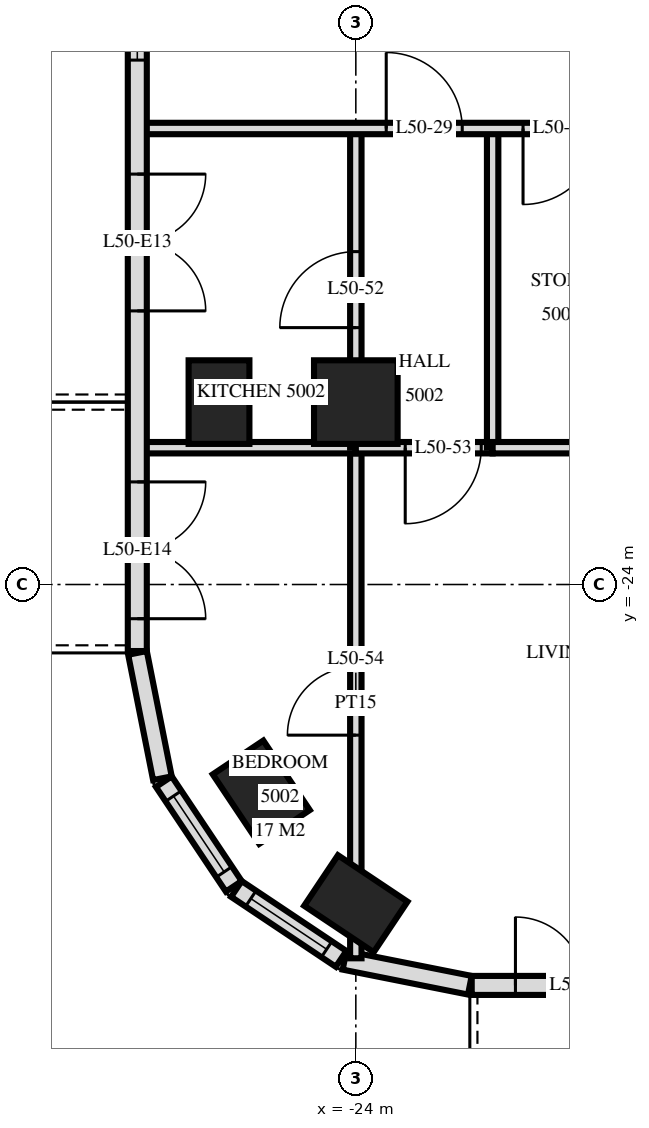
"""IFC4 building model, lengths in metres.
Left out: names, types, materials, properties, quantities, classifications, styles, units other than length and angle.
Written with IfcOpenShell. Run it as: python <this file> out.ifc"""

import sys

from ifc_helpers import new_model, si_unit, direction, frame, frame_2d, origin, origin_2d, place, context, subcontext, project, spatial, rectangle, extrude, element, fill, save


model = new_model("IFC4")
c1 = context("Model", 3, precision=1e-05, world=origin(), true_north=direction((0.0, 1.0)))
c2 = subcontext(c1, "Body", "Model", "MODEL_VIEW")
j1 = project(units=[si_unit("LENGTHUNIT", "METRE"), si_unit("PLANEANGLEUNIT", "RADIAN")], contexts=[c1])
p1 = place(None, origin())
s1 = spatial("IfcSite", under=j1, at=p1, CompositionType="ELEMENT")
p2 = place(p1, origin())
s2 = spatial("IfcBuilding", under=s1, at=p2, CompositionType="ELEMENT")
p3 = place(p2, frame((0.0, 0.0, 194.1)))
s3 = spatial("IfcBuildingStorey", under=s2, at=p3, CompositionType="ELEMENT", Elevation=194.1)
for number, where, z_axis, x_axis in (
    (1, (-25.8, -21.6, 0.0), (0.0, 0.0, 1.0), (0.0, 1.0, 0.0)),
    (2, (-25.244, -26.733, 0.0), (0.0, 0.0, 1.0), (-0.556, 0.831, 0.0)),
    (3, (-24.0, -28.2, 0.0), (0.0, 0.0, 1.0), (-0.831, 0.556, 0.0)),
):
    element("IfcColumn", number, at=place(p3, frame(where, z_axis=z_axis, x_axis=x_axis)), inside=s3, PredefinedType="COLUMN", context=c2, shape_type="SweptSolid", body=[
        extrude(rectangle(XDim=1.1, YDim=0.8, at=origin_2d()), origin(), (0.0, 0.0, 1.0), 3.5),
    ])
p4 = place(p3, frame((-24.0, -21.6, 0.0), z_axis=(0.0, 0.0, 1.0), x_axis=(1.0, 0.0, 0.0)))
e4 = element("IfcColumn", 4, at=p4, inside=s3, PredefinedType="COLUMN", context=c2, shape_type="SweptSolid", body=[
    extrude(rectangle(XDim=1.1, YDim=1.1, at=origin_2d()), origin(), (0.0, 0.0, 1.0), 3.5),
])
p5 = place(p3, frame((-26.875, -3.325, 0.0), z_axis=(0.0, 0.0, 1.0), x_axis=(0.0, -1.0, 0.0)))
e5 = element("IfcWall", 5, at=p5, inside=s3, PredefinedType="SOLIDWALL", context=c2, shape_type="SweptSolid", body=[
    extrude(rectangle(XDim=21.551, YDim=0.25, at=frame_2d((10.775, 0.0))), origin(), (0.0, 0.0, 1.0), 3.22),
])
p6 = place(p5, frame((7.775, 0.0, 0.0)))
e6 = element("IfcOpeningElement", 6, at=p6, cuts=e5, PredefinedType="OPENING", context=c2, shape_type="SweptSolid", body=[
    extrude(rectangle(XDim=1.8, YDim=2.4, at=frame_2d((0.9, 1.2))), frame((0.0, 0.135, 0.0), z_axis=(0.0, -1.0, 0.0), x_axis=(1.0, 0.0, 0.0)), (0.0, 0.0, 1.0), 0.27),
])
p7 = place(p5, frame((12.575, 0.0, 0.9)))
e7 = element("IfcOpeningElement", 7, at=p7, cuts=e5, PredefinedType="OPENING", context=c2, shape_type="SweptSolid", body=[
    extrude(rectangle(XDim=1.2, YDim=1.5, at=frame_2d((0.6, 0.75))), frame((0.0, 0.135, 0.0), z_axis=(0.0, -1.0, 0.0), x_axis=(1.0, 0.0, 0.0)), (0.0, 0.0, 1.0), 0.27),
])
p8 = place(p5, frame((15.275, 0.0, 0.0)))
e8 = element("IfcOpeningElement", 8, at=p8, cuts=e5, PredefinedType="OPENING", context=c2, shape_type="SweptSolid", body=[
    extrude(rectangle(XDim=1.8, YDim=2.4, at=frame_2d((0.9, 1.2))), frame((0.0, 0.135, 0.0), z_axis=(0.0, -1.0, 0.0), x_axis=(1.0, 0.0, 0.0)), (0.0, 0.0, 1.0), 0.27),
])
p9 = place(p5, frame((19.325, 0.0, 0.0)))
e9 = element("IfcOpeningElement", 9, at=p9, cuts=e5, PredefinedType="OPENING", context=c2, shape_type="SweptSolid", body=[
    extrude(rectangle(XDim=1.8, YDim=2.4, at=frame_2d((0.9, 1.2))), frame((0.0, 0.135, 0.0), z_axis=(0.0, -1.0, 0.0), x_axis=(1.0, 0.0, 0.0)), (0.0, 0.0, 1.0), 0.27),
])
p10 = place(p3, frame((-26.873, -24.9, 0.0), z_axis=(0.0, 0.0, 1.0), x_axis=(0.195026884138, -0.980797896849, 0.0)))
e10 = element("IfcWall", 10, at=p10, inside=s3, PredefinedType="SOLIDWALL", context=c2, shape_type="SweptSolid", body=[
    extrude(rectangle(XDim=1.681, YDim=0.25, at=frame_2d((0.841, 0.0))), origin(), (0.0, 0.0, 1.0), 3.22),
])
p11 = place(p3, frame((-26.526, -26.594, 0.0), z_axis=(0.0, 0.0, 1.0), x_axis=(0.55555029066, -0.831482937015, 0.0)))
e11 = element("IfcWall", 11, at=p11, inside=s3, PredefinedType="SOLIDWALL", context=c2, shape_type="SweptSolid", body=[
    extrude(rectangle(XDim=1.656, YDim=0.25, at=frame_2d((0.828, 0.0))), origin(), (0.0, 0.0, 1.0), 3.22),
])
p12 = place(p11, frame((0.228, 0.0, 0.9)))
e12 = element("IfcOpeningElement", 12, at=p12, cuts=e11, PredefinedType="OPENING", context=c2, shape_type="SweptSolid", body=[
    extrude(rectangle(XDim=1.2, YDim=1.5, at=frame_2d((0.6, 0.75))), frame((0.0, 0.135, 0.0), z_axis=(0.0, -1.0, 0.0), x_axis=(1.0, 0.0, 0.0)), (0.0, 0.0, 1.0), 0.27),
])
p13 = place(p3, frame((-25.571, -28.006, 0.0), z_axis=(0.0, 0.0, 1.0), x_axis=(0.831482937015, -0.55555029066, 0.0)))
e13 = element("IfcWall", 13, at=p13, inside=s3, PredefinedType="SOLIDWALL", context=c2, shape_type="SweptSolid", body=[
    extrude(rectangle(XDim=1.656, YDim=0.25, at=frame_2d((0.828, 0.0))), origin(), (0.0, 0.0, 1.0), 3.22),
])
p14 = place(p13, frame((0.228, 0.0, 0.9)))
e14 = element("IfcOpeningElement", 14, at=p14, cuts=e13, PredefinedType="OPENING", context=c2, shape_type="SweptSolid", body=[
    extrude(rectangle(XDim=1.2, YDim=1.5, at=frame_2d((0.6, 0.75))), frame((0.0, 0.135, 0.0), z_axis=(0.0, -1.0, 0.0), x_axis=(1.0, 0.0, 0.0)), (0.0, 0.0, 1.0), 0.27),
])
p15 = place(p3, frame((-24.149, -28.945, 0.0), z_axis=(0.0, 0.0, 1.0), x_axis=(0.980775640221, -0.19513878023, 0.0)))
e15 = element("IfcWall", 15, at=p15, inside=s3, PredefinedType="SOLIDWALL", context=c2, shape_type="SweptSolid", body=[
    extrude(rectangle(XDim=1.681, YDim=0.25, at=frame_2d((0.841, 0.0))), origin(), (0.0, 0.0, 1.0), 3.22),
])
p16 = place(p3, frame((-22.475, -29.275, 0.0), z_axis=(0.0, 0.0, 1.0), x_axis=(1.0, 0.0, 0.0)))
e16 = element("IfcWall", 16, at=p16, inside=s3, PredefinedType="SOLIDWALL", context=c2, shape_type="SweptSolid", body=[
    extrude(rectangle(XDim=44.951, YDim=0.25, at=frame_2d((22.475, 0.0))), origin(), (0.0, 0.0, 1.0), 3.22),
])
p17 = place(p16, frame((0.575, 0.0, 0.0)))
e17 = element("IfcOpeningElement", 17, at=p17, cuts=e16, PredefinedType="OPENING", context=c2, shape_type="SweptSolid", body=[
    extrude(rectangle(XDim=1.8, YDim=2.4, at=frame_2d((0.9, 1.2))), frame((0.0, 0.135, 0.0), z_axis=(0.0, -1.0, 0.0), x_axis=(1.0, 0.0, 0.0)), (0.0, 0.0, 1.0), 0.27),
])
p18 = place(p16, frame((6.575, 0.0, 0.0)))
e18 = element("IfcOpeningElement", 18, at=p18, cuts=e16, PredefinedType="OPENING", context=c2, shape_type="SweptSolid", body=[
    extrude(rectangle(XDim=1.8, YDim=2.4, at=frame_2d((0.9, 1.2))), frame((0.0, 0.135, 0.0), z_axis=(0.0, -1.0, 0.0), x_axis=(1.0, 0.0, 0.0)), (0.0, 0.0, 1.0), 0.27),
])
p19 = place(p16, frame((11.075, 0.0, 0.0)))
e19 = element("IfcOpeningElement", 19, at=p19, cuts=e16, PredefinedType="OPENING", context=c2, shape_type="SweptSolid", body=[
    extrude(rectangle(XDim=1.8, YDim=2.4, at=frame_2d((0.9, 1.2))), frame((0.0, 0.135, 0.0), z_axis=(0.0, -1.0, 0.0), x_axis=(1.0, 0.0, 0.0)), (0.0, 0.0, 1.0), 0.27),
])
p20 = place(p16, frame((13.775, 0.0, 0.9)))
e20 = element("IfcOpeningElement", 20, at=p20, cuts=e16, PredefinedType="OPENING", context=c2, shape_type="SweptSolid", body=[
    extrude(rectangle(XDim=2.4, YDim=1.5, at=frame_2d((1.2, 0.75))), frame((0.0, 0.135, 0.0), z_axis=(0.0, -1.0, 0.0), x_axis=(1.0, 0.0, 0.0)), (0.0, 0.0, 1.0), 0.27),
])
p21 = place(p16, frame((16.775, 0.0, 0.9)))
e21 = element("IfcOpeningElement", 21, at=p21, cuts=e16, PredefinedType="OPENING", context=c2, shape_type="SweptSolid", body=[
    extrude(rectangle(XDim=2.4, YDim=1.5, at=frame_2d((1.2, 0.75))), frame((0.0, 0.135, 0.0), z_axis=(0.0, -1.0, 0.0), x_axis=(1.0, 0.0, 0.0)), (0.0, 0.0, 1.0), 0.27),
])
p22 = place(p16, frame((20.075, 0.0, 0.0)))
e22 = element("IfcOpeningElement", 22, at=p22, cuts=e16, PredefinedType="OPENING", context=c2, shape_type="SweptSolid", body=[
    extrude(rectangle(XDim=1.8, YDim=2.4, at=frame_2d((0.9, 1.2))), frame((0.0, 0.135, 0.0), z_axis=(0.0, -1.0, 0.0), x_axis=(1.0, 0.0, 0.0)), (0.0, 0.0, 1.0), 0.27),
])
p23 = place(p16, frame((23.075, 0.0, 0.0)))
e23 = element("IfcOpeningElement", 23, at=p23, cuts=e16, PredefinedType="OPENING", context=c2, shape_type="SweptSolid", body=[
    extrude(rectangle(XDim=1.8, YDim=2.4, at=frame_2d((0.9, 1.2))), frame((0.0, 0.135, 0.0), z_axis=(0.0, -1.0, 0.0), x_axis=(1.0, 0.0, 0.0)), (0.0, 0.0, 1.0), 0.27),
])
p24 = place(p16, frame((25.775, 0.0, 0.9)))
e24 = element("IfcOpeningElement", 24, at=p24, cuts=e16, PredefinedType="OPENING", context=c2, shape_type="SweptSolid", body=[
    extrude(rectangle(XDim=2.4, YDim=1.5, at=frame_2d((1.2, 0.75))), frame((0.0, 0.135, 0.0), z_axis=(0.0, -1.0, 0.0), x_axis=(1.0, 0.0, 0.0)), (0.0, 0.0, 1.0), 0.27),
])
p25 = place(p16, frame((29.075, 0.0, 0.0)))
e25 = element("IfcOpeningElement", 25, at=p25, cuts=e16, PredefinedType="OPENING", context=c2, shape_type="SweptSolid", body=[
    extrude(rectangle(XDim=1.8, YDim=2.4, at=frame_2d((0.9, 1.2))), frame((0.0, 0.135, 0.0), z_axis=(0.0, -1.0, 0.0), x_axis=(1.0, 0.0, 0.0)), (0.0, 0.0, 1.0), 0.27),
])
p26 = place(p16, frame((31.775, 0.0, 0.9)))
e26 = element("IfcOpeningElement", 26, at=p26, cuts=e16, PredefinedType="OPENING", context=c2, shape_type="SweptSolid", body=[
    extrude(rectangle(XDim=2.4, YDim=1.5, at=frame_2d((1.2, 0.75))), frame((0.0, 0.135, 0.0), z_axis=(0.0, -1.0, 0.0), x_axis=(1.0, 0.0, 0.0)), (0.0, 0.0, 1.0), 0.27),
])
p27 = place(p16, frame((35.075, 0.0, 0.0)))
e27 = element("IfcOpeningElement", 27, at=p27, cuts=e16, PredefinedType="OPENING", context=c2, shape_type="SweptSolid", body=[
    extrude(rectangle(XDim=1.8, YDim=2.4, at=frame_2d((0.9, 1.2))), frame((0.0, 0.135, 0.0), z_axis=(0.0, -1.0, 0.0), x_axis=(1.0, 0.0, 0.0)), (0.0, 0.0, 1.0), 0.27),
])
p28 = place(p16, frame((37.775, 0.0, 0.9)))
e28 = element("IfcOpeningElement", 28, at=p28, cuts=e16, PredefinedType="OPENING", context=c2, shape_type="SweptSolid", body=[
    extrude(rectangle(XDim=2.4, YDim=1.5, at=frame_2d((1.2, 0.75))), frame((0.0, 0.135, 0.0), z_axis=(0.0, -1.0, 0.0), x_axis=(1.0, 0.0, 0.0)), (0.0, 0.0, 1.0), 0.27),
])
p29 = place(p16, frame((41.075, 0.0, 0.0)))
e29 = element("IfcOpeningElement", 29, at=p29, cuts=e16, PredefinedType="OPENING", context=c2, shape_type="SweptSolid", body=[
    extrude(rectangle(XDim=1.8, YDim=2.4, at=frame_2d((0.9, 1.2))), frame((0.0, 0.135, 0.0), z_axis=(0.0, -1.0, 0.0), x_axis=(1.0, 0.0, 0.0)), (0.0, 0.0, 1.0), 0.27),
])
p30 = place(p3, frame((-22.2, -22.2, 0.0), z_axis=(0.0, 0.0, 1.0), x_axis=(0.0, 1.0, 0.0)))
e30 = element("IfcWall", 30, at=p30, inside=s3, PredefinedType="PARTITIONING", context=c2, shape_type="SweptSolid", body=[
    extrude(rectangle(XDim=4.2, YDim=0.15, at=frame_2d((2.1, 0.0))), origin(), (0.0, 0.0, 1.0), 3.22),
])
p31 = place(p3, frame((-24.0, -22.2, 0.0), z_axis=(0.0, 0.0, 1.0), x_axis=(0.0, 1.0, 0.0)))
e31 = element("IfcWall", 31, at=p31, inside=s3, PredefinedType="PARTITIONING", context=c2, shape_type="SweptSolid", body=[
    extrude(rectangle(XDim=4.2, YDim=0.15, at=frame_2d((2.1, 0.0))), origin(), (0.0, 0.0, 1.0), 3.22),
])
p32 = place(p31, frame((1.58, 0.0, 0.0)))
e32 = element("IfcOpeningElement", 32, at=p32, cuts=e31, PredefinedType="OPENING", context=c2, shape_type="SweptSolid", body=[
    extrude(rectangle(XDim=1.0, YDim=2.1, at=frame_2d((0.5, 1.05))), frame((0.0, 0.085, 0.0), z_axis=(0.0, -1.0, 0.0), x_axis=(1.0, 0.0, 0.0)), (0.0, 0.0, 1.0), 0.17),
])
p33 = place(p3, frame((-24.0, -28.918, 0.0), z_axis=(0.0, 0.0, 1.0), x_axis=(0.0, 1.0, 0.0)))
e33 = element("IfcWall", 33, at=p33, inside=s3, PredefinedType="PARTITIONING", context=c2, shape_type="SweptSolid", body=[
    extrude(rectangle(XDim=6.718, YDim=0.15, at=frame_2d((3.359, 0.0))), origin(), (0.0, 0.0, 1.0), 3.22),
])
p34 = place(p33, frame((2.936, 0.0, 0.0)))
e34 = element("IfcOpeningElement", 34, at=p34, cuts=e33, PredefinedType="OPENING", context=c2, shape_type="SweptSolid", body=[
    extrude(rectangle(XDim=0.9, YDim=2.1, at=frame_2d((0.45, 1.05))), frame((0.0, 0.085, 0.0), z_axis=(0.0, -1.0, 0.0), x_axis=(1.0, 0.0, 0.0)), (0.0, 0.0, 1.0), 0.17),
])
p35 = place(p3, frame((-24.0, -22.2, 0.0), z_axis=(0.0, 0.0, 1.0), x_axis=(1.0, 0.0, 0.0)))
e35 = element("IfcWall", 35, at=p35, inside=s3, PredefinedType="PARTITIONING", context=c2, shape_type="SweptSolid", body=[
    extrude(rectangle(XDim=1.8, YDim=0.15, at=frame_2d((0.9, 0.0))), origin(), (0.0, 0.0, 1.0), 3.22),
])
p36 = place(p35, frame((0.65, 0.0, 0.0)))
e36 = element("IfcOpeningElement", 36, at=p36, cuts=e35, PredefinedType="OPENING", context=c2, shape_type="SweptSolid", body=[
    extrude(rectangle(XDim=1.0, YDim=2.1, at=frame_2d((0.5, 1.05))), frame((0.0, 0.085, 0.0), z_axis=(0.0, -1.0, 0.0), x_axis=(1.0, 0.0, 0.0)), (0.0, 0.0, 1.0), 0.17),
])
p37 = place(p3, frame((-26.82, -22.2, 0.0), z_axis=(0.0, 0.0, 1.0), x_axis=(1.0, 0.0, 0.0)))
e37 = element("IfcWall", 37, at=p37, inside=s3, PredefinedType="PARTITIONING", context=c2, shape_type="SweptSolid", body=[
    extrude(rectangle(XDim=2.82, YDim=0.15, at=frame_2d((1.41, 0.0))), origin(), (0.0, 0.0, 1.0), 3.22),
])
p38 = place(p3, frame((-22.2, -22.2, 0.0), z_axis=(0.0, 0.0, 1.0), x_axis=(1.0, 0.0, 0.0)))
e38 = element("IfcWall", 38, at=p38, inside=s3, PredefinedType="PARTITIONING", context=c2, shape_type="SweptSolid", body=[
    extrude(rectangle(XDim=4.2, YDim=0.15, at=frame_2d((2.1, 0.0))), origin(), (0.0, 0.0, 1.0), 3.22),
])
p39 = place(p38, frame((2.58, 0.0, 0.0)))
e39 = element("IfcOpeningElement", 39, at=p39, cuts=e38, PredefinedType="OPENING", context=c2, shape_type="SweptSolid", body=[
    extrude(rectangle(XDim=0.8, YDim=2.1, at=frame_2d((0.4, 1.05))), frame((0.0, 0.085, 0.0), z_axis=(0.0, -1.0, 0.0), x_axis=(1.0, 0.0, 0.0)), (0.0, 0.0, 1.0), 0.17),
])
p40 = place(p3, frame((-26.82, -18.0, 0.0), z_axis=(0.0, 0.0, 1.0), x_axis=(1.0, 0.0, 0.0)))
e40 = element("IfcWall", 40, at=p40, inside=s3, PredefinedType="PARTITIONING", context=c2, shape_type="SweptSolid", body=[
    extrude(rectangle(XDim=53.64, YDim=0.15, at=frame_2d((26.82, 0.0))), origin(), (0.0, 0.0, 1.0), 3.22),
])
p41 = place(p40, frame((11.32, 0.0, 0.0)))
e41 = element("IfcOpeningElement", 41, at=p41, cuts=e40, PredefinedType="OPENING", context=c2, shape_type="SweptSolid", body=[
    extrude(rectangle(XDim=1.0, YDim=2.1, at=frame_2d((0.5, 1.05))), frame((0.0, 0.085, 0.0), z_axis=(0.0, -1.0, 0.0), x_axis=(1.0, 0.0, 0.0)), (0.0, 0.0, 1.0), 0.17),
])
p42 = place(p40, frame((3.22, 0.0, 0.0)))
e42 = element("IfcOpeningElement", 42, at=p42, cuts=e40, PredefinedType="OPENING", context=c2, shape_type="SweptSolid", body=[
    extrude(rectangle(XDim=1.0, YDim=2.1, at=frame_2d((0.5, 1.05))), frame((0.0, 0.085, 0.0), z_axis=(0.0, -1.0, 0.0), x_axis=(1.0, 0.0, 0.0)), (0.0, 0.0, 1.0), 0.17),
])
p43 = place(p40, frame((5.02, 0.0, 0.0)))
e43 = element("IfcOpeningElement", 43, at=p43, cuts=e40, PredefinedType="OPENING", context=c2, shape_type="SweptSolid", body=[
    extrude(rectangle(XDim=1.0, YDim=2.1, at=frame_2d((0.5, 1.05))), frame((0.0, 0.085, 0.0), z_axis=(0.0, -1.0, 0.0), x_axis=(1.0, 0.0, 0.0)), (0.0, 0.0, 1.0), 0.17),
])
p44 = place(p40, frame((38.97, 0.0, 0.0)))
e44 = element("IfcOpeningElement", 44, at=p44, cuts=e40, PredefinedType="OPENING", context=c2, shape_type="SweptSolid", body=[
    extrude(rectangle(XDim=1.0, YDim=2.1, at=frame_2d((0.5, 1.05))), frame((0.0, 0.085, 0.0), z_axis=(0.0, -1.0, 0.0), x_axis=(1.0, 0.0, 0.0)), (0.0, 0.0, 1.0), 0.17),
])
p45 = place(p40, frame((48.72, 0.0, 0.0)))
e45 = element("IfcOpeningElement", 45, at=p45, cuts=e40, PredefinedType="OPENING", context=c2, shape_type="SweptSolid", body=[
    extrude(rectangle(XDim=1.0, YDim=2.1, at=frame_2d((0.5, 1.05))), frame((0.0, 0.085, 0.0), z_axis=(0.0, -1.0, 0.0), x_axis=(1.0, 0.0, 0.0)), (0.0, 0.0, 1.0), 0.17),
])
p46 = place(p40, frame((46.92, 0.0, 0.0)))
e46 = element("IfcOpeningElement", 46, at=p46, cuts=e40, PredefinedType="OPENING", context=c2, shape_type="SweptSolid", body=[
    extrude(rectangle(XDim=1.0, YDim=2.1, at=frame_2d((0.5, 1.05))), frame((0.0, 0.085, 0.0), z_axis=(0.0, -1.0, 0.0), x_axis=(1.0, 0.0, 0.0)), (0.0, 0.0, 1.0), 0.17),
])
p47 = place(p40, frame((17.32, 0.0, 0.0)))
e47 = element("IfcOpeningElement", 47, at=p47, cuts=e40, PredefinedType="OPENING", context=c2, shape_type="SweptSolid", body=[
    extrude(rectangle(XDim=1.0, YDim=2.1, at=frame_2d((0.5, 1.05))), frame((0.0, 0.085, 0.0), z_axis=(0.0, -1.0, 0.0), x_axis=(1.0, 0.0, 0.0)), (0.0, 0.0, 1.0), 0.17),
])
p48 = place(p40, frame((23.32, 0.0, 0.0)))
e48 = element("IfcOpeningElement", 48, at=p48, cuts=e40, PredefinedType="OPENING", context=c2, shape_type="SweptSolid", body=[
    extrude(rectangle(XDim=1.0, YDim=2.1, at=frame_2d((0.5, 1.05))), frame((0.0, 0.085, 0.0), z_axis=(0.0, -1.0, 0.0), x_axis=(1.0, 0.0, 0.0)), (0.0, 0.0, 1.0), 0.17),
])
p49 = place(p40, frame((29.32, 0.0, 0.0)))
e49 = element("IfcOpeningElement", 49, at=p49, cuts=e40, PredefinedType="OPENING", context=c2, shape_type="SweptSolid", body=[
    extrude(rectangle(XDim=1.0, YDim=2.1, at=frame_2d((0.5, 1.05))), frame((0.0, 0.085, 0.0), z_axis=(0.0, -1.0, 0.0), x_axis=(1.0, 0.0, 0.0)), (0.0, 0.0, 1.0), 0.17),
])
p50 = place(p40, frame((35.32, 0.0, 0.0)))
e50 = element("IfcOpeningElement", 50, at=p50, cuts=e40, PredefinedType="OPENING", context=c2, shape_type="SweptSolid", body=[
    extrude(rectangle(XDim=1.0, YDim=2.1, at=frame_2d((0.5, 1.05))), frame((0.0, 0.085, 0.0), z_axis=(0.0, -1.0, 0.0), x_axis=(1.0, 0.0, 0.0)), (0.0, 0.0, 1.0), 0.17),
])
p51 = place(p12, origin())
e51 = element("IfcWindow", 51, at=p51, inside=s3, PartitioningType="SINGLE_PANEL", PredefinedType="WINDOW", context=c2, shape_type="SweptSolid", body=[
    extrude(rectangle(XDim=1.2, YDim=1.5, at=frame_2d((0.6, 0.75))), frame((0.0, 0.03, 0.0), z_axis=(0.0, -1.0, 0.0), x_axis=(1.0, 0.0, 0.0)), (0.0, 0.0, 1.0), 0.06),
])
fill(e12, e51)
p52 = place(p14, origin())
e52 = element("IfcWindow", 52, at=p52, inside=s3, PartitioningType="SINGLE_PANEL", PredefinedType="WINDOW", context=c2, shape_type="SweptSolid", body=[
    extrude(rectangle(XDim=1.2, YDim=1.5, at=frame_2d((0.6, 0.75))), frame((0.0, 0.03, 0.0), z_axis=(0.0, -1.0, 0.0), x_axis=(1.0, 0.0, 0.0)), (0.0, 0.0, 1.0), 0.06),
])
fill(e14, e52)
p53 = place(p17, origin())
e53 = element("IfcDoor", 53, at=p53, inside=s3, OperationType="DOUBLE_DOOR_SINGLE_SWING", PredefinedType="DOOR", context=c2, shape_type="SweptSolid", body=[
    extrude(rectangle(XDim=1.8, YDim=2.4, at=frame_2d((0.9, 1.2))), frame((0.0, 0.025, 0.0), z_axis=(0.0, -1.0, 0.0), x_axis=(1.0, 0.0, 0.0)), (0.0, 0.0, 1.0), 0.05),
])
fill(e17, e53)
p54 = place(p7, origin())
e54 = element("IfcWindow", 54, at=p54, inside=s3, PartitioningType="SINGLE_PANEL", PredefinedType="WINDOW", context=c2, shape_type="SweptSolid", body=[
    extrude(rectangle(XDim=1.2, YDim=1.5, at=frame_2d((0.6, 0.75))), frame((0.0, 0.03, 0.0), z_axis=(0.0, -1.0, 0.0), x_axis=(1.0, 0.0, 0.0)), (0.0, 0.0, 1.0), 0.06),
])
fill(e7, e54)
p55 = place(p8, origin())
e55 = element("IfcDoor", 55, at=p55, inside=s3, OperationType="DOUBLE_DOOR_SINGLE_SWING", PredefinedType="DOOR", context=c2, shape_type="SweptSolid", body=[
    extrude(rectangle(XDim=1.8, YDim=2.4, at=frame_2d((0.9, 1.2))), frame((0.0, 0.025, 0.0), z_axis=(0.0, -1.0, 0.0), x_axis=(1.0, 0.0, 0.0)), (0.0, 0.0, 1.0), 0.05),
])
fill(e8, e55)
p56 = place(p9, origin())
e56 = element("IfcDoor", 56, at=p56, inside=s3, OperationType="DOUBLE_DOOR_SINGLE_SWING", PredefinedType="DOOR", context=c2, shape_type="SweptSolid", body=[
    extrude(rectangle(XDim=1.8, YDim=2.4, at=frame_2d((0.9, 1.2))), frame((0.0, 0.025, 0.0), z_axis=(0.0, -1.0, 0.0), x_axis=(1.0, 0.0, 0.0)), (0.0, 0.0, 1.0), 0.05),
])
fill(e9, e56)
p57 = place(p42, origin())
e57 = element("IfcDoor", 57, at=p57, inside=s3, OperationType="SINGLE_SWING_RIGHT", PredefinedType="DOOR", context=c2, shape_type="SweptSolid", body=[
    extrude(rectangle(XDim=1.0, YDim=2.1, at=frame_2d((0.5, 1.05))), frame((0.0, 0.025, 0.0), z_axis=(0.0, -1.0, 0.0), x_axis=(1.0, 0.0, 0.0)), (0.0, 0.0, 1.0), 0.05),
])
fill(e42, e57)
p58 = place(p43, frame((0.5, 0.0, 0.0), z_axis=(0.0, 0.0, 1.0), x_axis=(-1.0, 0.0, 0.0)))
e58 = element("IfcDoor", 58, at=p58, inside=s3, OperationType="SINGLE_SWING_LEFT", PredefinedType="DOOR", context=c2, shape_type="SweptSolid", body=[
    extrude(rectangle(XDim=1.0, YDim=2.1, at=frame_2d((0.0, 1.05))), frame((0.0, -0.025, 0.0), z_axis=(0.0, 1.0, 0.0), x_axis=(-1.0, 0.0, 0.0)), (0.0, 0.0, 1.0), 0.05),
])
fill(e43, e58)
p59 = place(p32, origin())
e59 = element("IfcDoor", 59, at=p59, inside=s3, OperationType="SINGLE_SWING_RIGHT", PredefinedType="DOOR", context=c2, shape_type="SweptSolid", body=[
    extrude(rectangle(XDim=1.0, YDim=2.1, at=frame_2d((0.5, 1.05))), frame((0.0, 0.025, 0.0), z_axis=(0.0, -1.0, 0.0), x_axis=(1.0, 0.0, 0.0)), (0.0, 0.0, 1.0), 0.05),
])
fill(e32, e59)
p60 = place(p36, frame((0.5, 0.0, 0.0), z_axis=(0.0, 0.0, 1.0), x_axis=(-1.0, 0.0, 0.0)))
e60 = element("IfcDoor", 60, at=p60, inside=s3, OperationType="SINGLE_SWING_LEFT", PredefinedType="DOOR", context=c2, shape_type="SweptSolid", body=[
    extrude(rectangle(XDim=1.0, YDim=2.1, at=frame_2d((0.0, 1.05))), frame((0.0, -0.025, 0.0), z_axis=(0.0, 1.0, 0.0), x_axis=(-1.0, 0.0, 0.0)), (0.0, 0.0, 1.0), 0.05),
])
fill(e36, e60)
p61 = place(p34, origin())
e61 = element("IfcDoor", 61, at=p61, inside=s3, OperationType="SINGLE_SWING_RIGHT", PredefinedType="DOOR", context=c2, shape_type="SweptSolid", body=[
    extrude(rectangle(XDim=0.9, YDim=2.1, at=frame_2d((0.45, 1.05))), frame((0.0, 0.025, 0.0), z_axis=(0.0, -1.0, 0.0), x_axis=(1.0, 0.0, 0.0)), (0.0, 0.0, 1.0), 0.05),
])
fill(e34, e61)
save(model, sys.argv[1])
